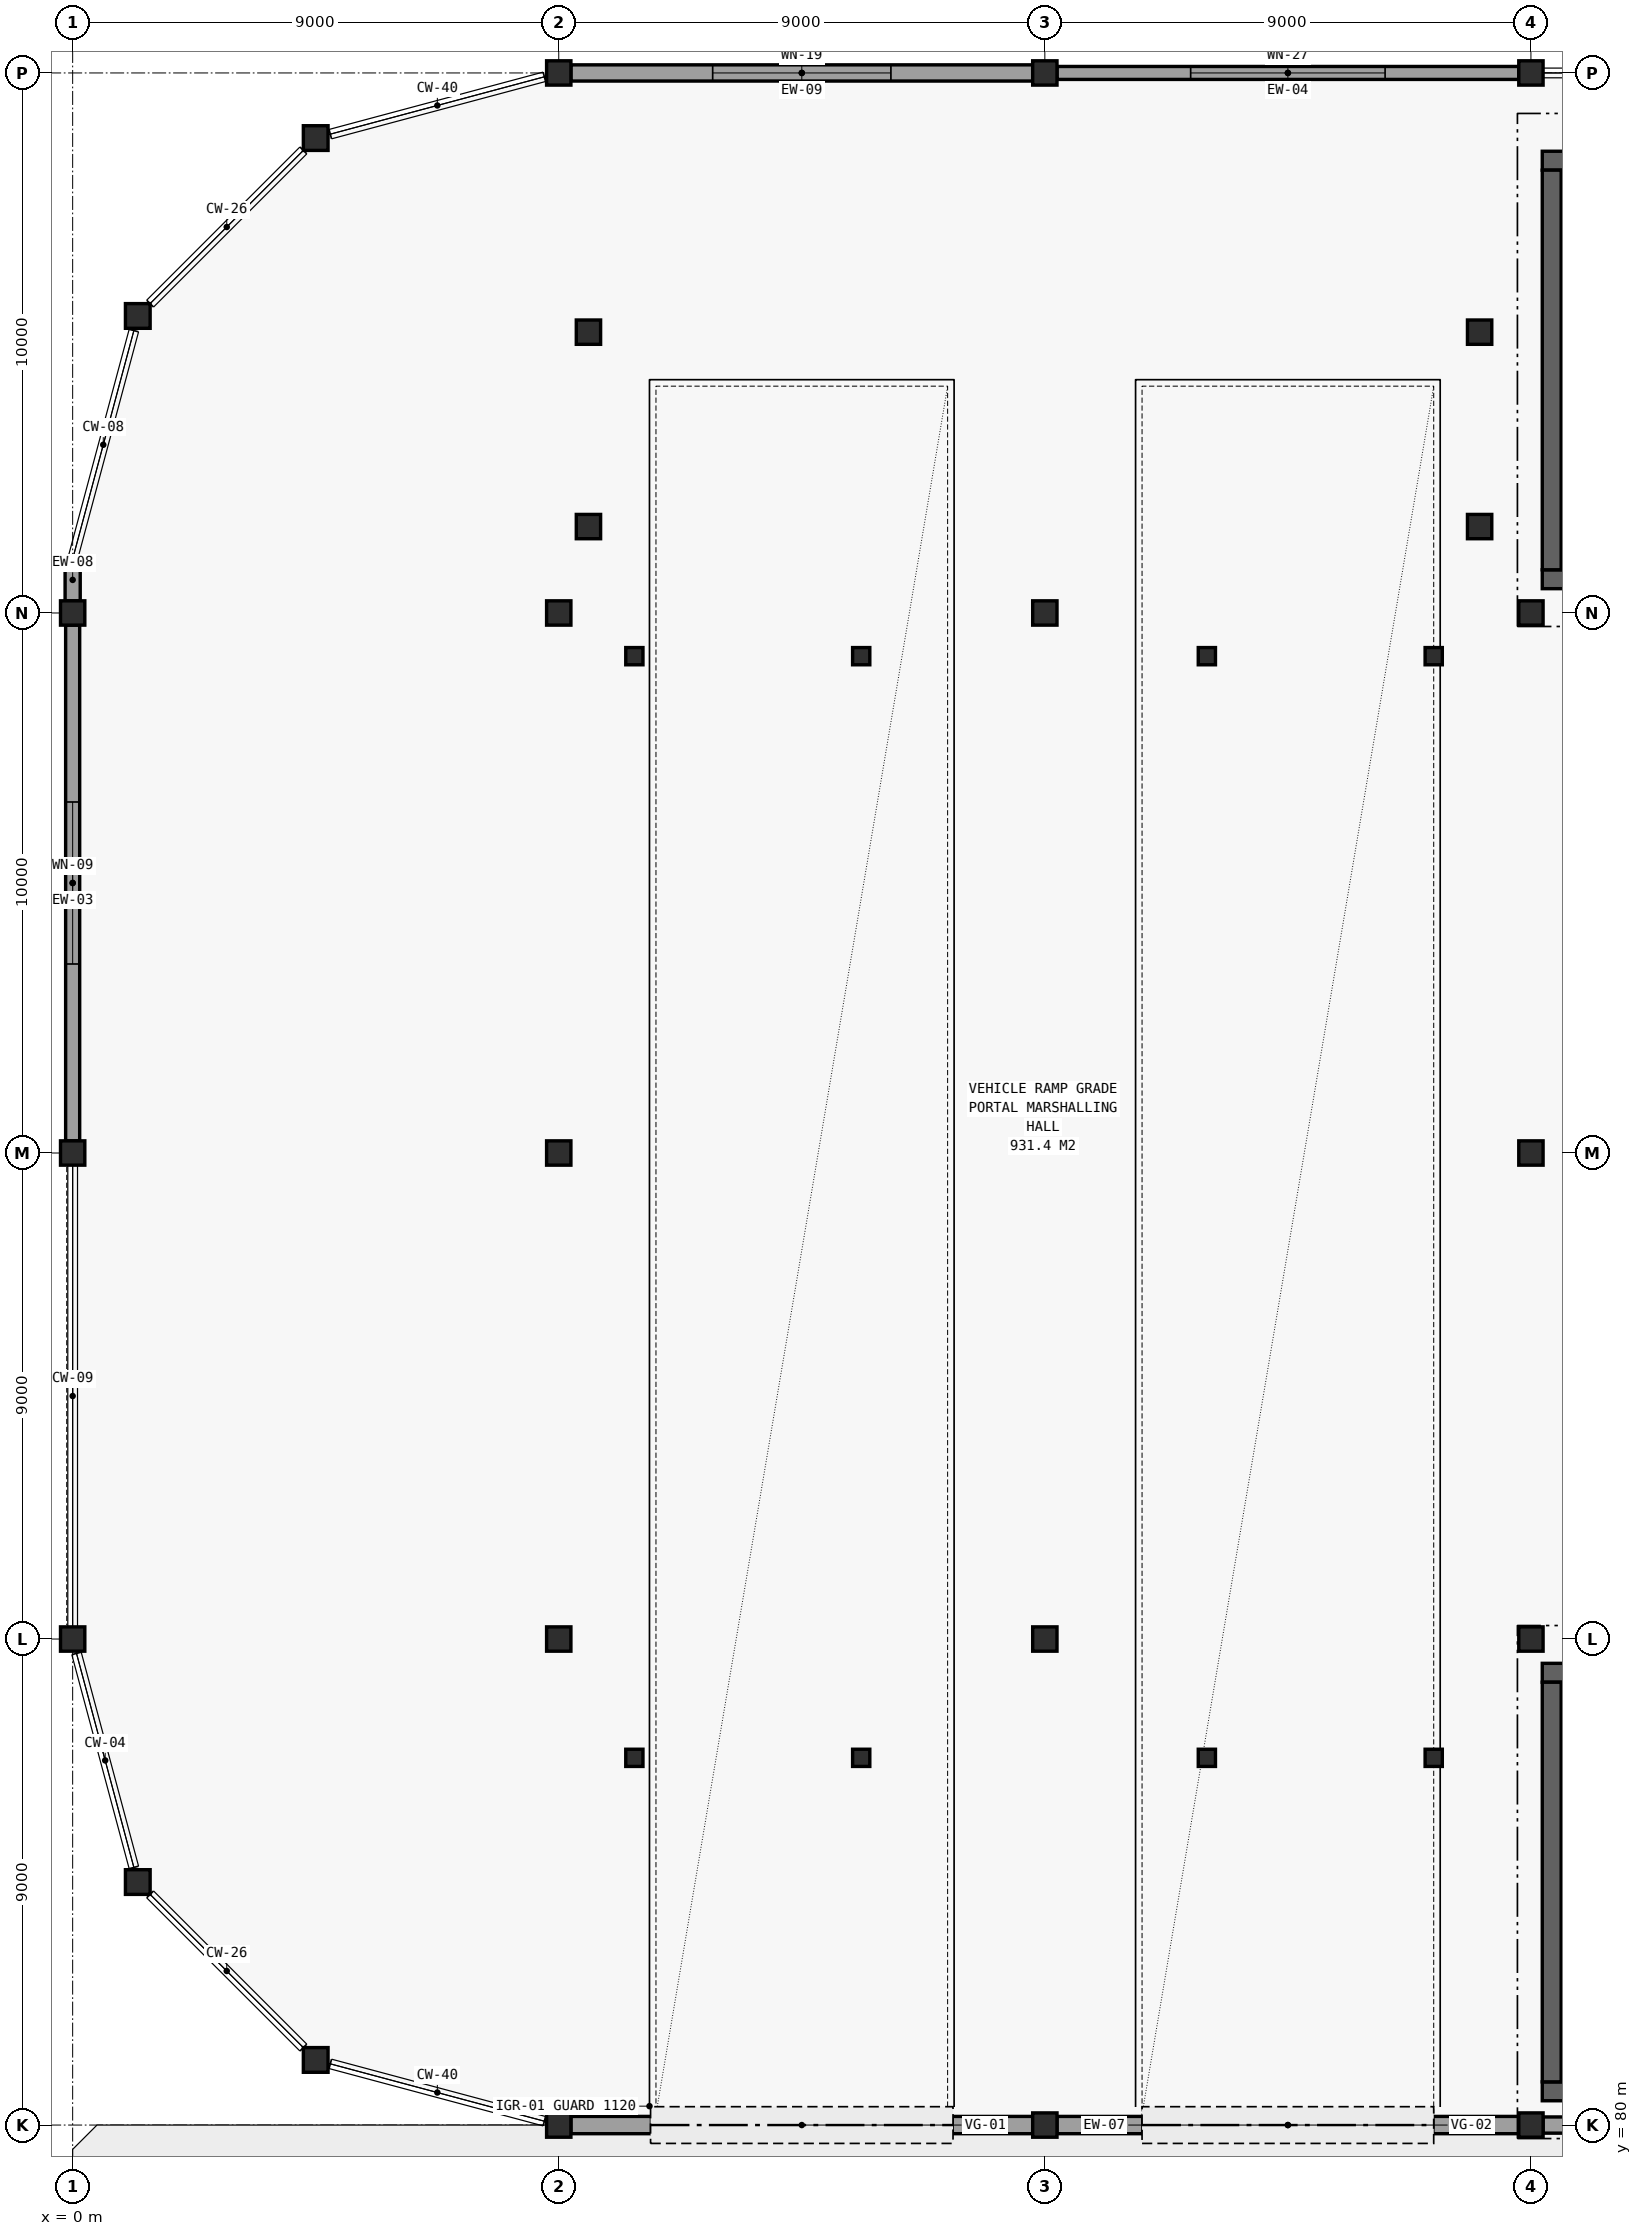
"""IFC4 building model, lengths in metres.
Left out: names, types, materials, properties, quantities, classifications, styles, units other than length and angle.
Written with IfcOpenShell. Run it as: python <this file> out.ifc"""

import sys

from ifc_helpers import new_model, si_unit, direction, frame, frame_2d, origin, origin_2d, place, context, subcontext, project, spatial, rectangle, hollow_rectangle, hollow_circle, extrude, element, fill, save


model = new_model("IFC4")
c1 = context("Model", 3, precision=1e-05, world=origin(), true_north=direction((0.0, 1.0)))
c2 = subcontext(c1, "Body", "Model", "MODEL_VIEW")
j1 = project(units=[si_unit("LENGTHUNIT", "METRE"), si_unit("PLANEANGLEUNIT", "RADIAN")], contexts=[c1])
p1 = place(None, origin())
s1 = spatial("IfcSite", under=j1, at=p1, CompositionType="ELEMENT")
p2 = place(p1, origin())
s2 = spatial("IfcBuilding", under=s1, at=p2, CompositionType="ELEMENT")
p3 = place(p2, origin())
s3 = spatial("IfcBuildingStorey", under=s2, at=p3, CompositionType="ELEMENT", Elevation=0.0)
for number, where, z_axis, x_axis in (
    (1, (0.0, 89.0, 0.0), (0.0, 0.0, 1.0), (1.0, 0.0, 0.0)),
    (2, (0.0, 98.0, 0.0), (0.0, 0.0, 1.0), (1.0, 0.0, 0.0)),
    (3, (0.0, 108.0, 0.0), (0.0, 0.0, 1.0), (1.0, 0.0, 0.0)),
):
    element("IfcColumn", number, at=place(p3, frame(where, z_axis=z_axis, x_axis=x_axis)), inside=s3, PredefinedType="COLUMN", context=c2, shape_type="SweptSolid", body=[
        extrude(hollow_rectangle(XDim=0.45, YDim=0.45, WallThickness=0.022, at=origin_2d()), origin(), (0.0, 0.0, 1.0), 5.1),
    ])
for number, where, z_axis, x_axis in (
    (4, (1.206, 84.5, 0.0), (0.0, 0.0, 1.0), (1.0, 0.0, 0.0)),
    (5, (1.206, 113.5, 0.0), (0.0, 0.0, 1.0), (1.0, 0.0, 0.0)),
    (6, (4.5, 81.206, 0.0), (0.0, 0.0, 1.0), (1.0, 0.0, 0.0)),
    (7, (4.5, 116.794, 0.0), (0.0, 0.0, 1.0), (1.0, 0.0, 0.0)),
):
    element("IfcColumn", number, at=place(p3, frame(where, z_axis=z_axis, x_axis=x_axis)), inside=s3, PredefinedType="COLUMN", context=c2, shape_type="SweptSolid", body=[
        extrude(hollow_circle(Radius=0.229, WallThickness=0.016, at=origin_2d()), origin(), (0.0, 0.0, 1.0), 5.1),
    ])
for number, where, z_axis, x_axis in (
    (8, (9.0, 80.0, 0.0), (0.0, 0.0, 1.0), (1.0, 0.0, 0.0)),
    (9, (9.0, 89.0, 0.0), (0.0, 0.0, 1.0), (1.0, 0.0, 0.0)),
    (10, (9.0, 98.0, 0.0), (0.0, 0.0, 1.0), (1.0, 0.0, 0.0)),
    (11, (9.0, 108.0, 0.0), (0.0, 0.0, 1.0), (1.0, 0.0, 0.0)),
    (12, (9.0, 118.0, 0.0), (0.0, 0.0, 1.0), (1.0, 0.0, 0.0)),
    (13, (9.55, 109.6, 0.0), (0.0, 0.0, 1.0), (1.0, 0.0, 0.0)),
    (14, (9.55, 113.2, 0.0), (0.0, 0.0, 1.0), (1.0, 0.0, 0.0)),
):
    element("IfcColumn", number, at=place(p3, frame(where, z_axis=z_axis, x_axis=x_axis)), inside=s3, PredefinedType="COLUMN", context=c2, shape_type="SweptSolid", body=[
        extrude(hollow_rectangle(XDim=0.45, YDim=0.45, WallThickness=0.022, at=origin_2d()), origin(), (0.0, 0.0, 1.0), 5.1),
    ])
for number, where, z_axis, x_axis in (
    (15, (10.4, 86.8, 0.0), (0.0, 0.0, 1.0), (1.0, 0.0, 0.0)),
    (16, (10.4, 107.2, 0.0), (0.0, 0.0, 1.0), (1.0, 0.0, 0.0)),
    (17, (14.6, 86.8, 0.0), (0.0, 0.0, 1.0), (1.0, 0.0, 0.0)),
    (18, (14.6, 107.2, 0.0), (0.0, 0.0, 1.0), (1.0, 0.0, 0.0)),
):
    element("IfcColumn", number, at=place(p3, frame(where, z_axis=z_axis, x_axis=x_axis)), inside=s3, PredefinedType="COLUMN", context=c2, shape_type="SweptSolid", body=[
        extrude(hollow_circle(Radius=0.159, WallThickness=0.01, at=origin_2d()), origin(), (0.0, 0.0, 1.0), 5.1),
    ])
for number, where, z_axis, x_axis in (
    (19, (18.0, 80.0, 0.0), (0.0, 0.0, 1.0), (1.0, 0.0, 0.0)),
    (20, (18.0, 89.0, 0.0), (0.0, 0.0, 1.0), (1.0, 0.0, 0.0)),
    (21, (18.0, 108.0, 0.0), (0.0, 0.0, 1.0), (1.0, 0.0, 0.0)),
    (22, (18.0, 118.0, 0.0), (0.0, 0.0, 1.0), (1.0, 0.0, 0.0)),
):
    element("IfcColumn", number, at=place(p3, frame(where, z_axis=z_axis, x_axis=x_axis)), inside=s3, PredefinedType="COLUMN", context=c2, shape_type="SweptSolid", body=[
        extrude(hollow_rectangle(XDim=0.45, YDim=0.45, WallThickness=0.022, at=origin_2d()), origin(), (0.0, 0.0, 1.0), 5.1),
    ])
for number, where, z_axis, x_axis in (
    (23, (21.0, 86.8, 0.0), (0.0, 0.0, 1.0), (1.0, 0.0, 0.0)),
    (24, (21.0, 107.2, 0.0), (0.0, 0.0, 1.0), (1.0, 0.0, 0.0)),
    (25, (25.2, 86.8, 0.0), (0.0, 0.0, 1.0), (1.0, 0.0, 0.0)),
    (26, (25.2, 107.2, 0.0), (0.0, 0.0, 1.0), (1.0, 0.0, 0.0)),
):
    element("IfcColumn", number, at=place(p3, frame(where, z_axis=z_axis, x_axis=x_axis)), inside=s3, PredefinedType="COLUMN", context=c2, shape_type="SweptSolid", body=[
        extrude(hollow_circle(Radius=0.159, WallThickness=0.01, at=origin_2d()), origin(), (0.0, 0.0, 1.0), 5.1),
    ])
for number, where, z_axis, x_axis in (
    (27, (26.05, 109.6, 0.0), (0.0, 0.0, 1.0), (1.0, 0.0, 0.0)),
    (28, (26.05, 113.2, 0.0), (0.0, 0.0, 1.0), (1.0, 0.0, 0.0)),
    (29, (27.0, 80.0, 0.0), (0.0, 0.0, 1.0), (1.0, 0.0, 0.0)),
    (30, (27.0, 89.0, 0.0), (0.0, 0.0, 1.0), (1.0, 0.0, 0.0)),
    (31, (27.0, 98.0, 0.0), (0.0, 0.0, 1.0), (1.0, 0.0, 0.0)),
    (32, (27.0, 108.0, 0.0), (0.0, 0.0, 1.0), (1.0, 0.0, 0.0)),
    (33, (27.0, 118.0, 0.0), (0.0, 0.0, 1.0), (1.0, 0.0, 0.0)),
):
    element("IfcColumn", number, at=place(p3, frame(where, z_axis=z_axis, x_axis=x_axis)), inside=s3, PredefinedType="COLUMN", context=c2, shape_type="SweptSolid", body=[
        extrude(hollow_rectangle(XDim=0.45, YDim=0.45, WallThickness=0.022, at=origin_2d()), origin(), (0.0, 0.0, 1.0), 5.1),
    ])
p4 = place(p3, frame((9.225, 80.0, 0.0), z_axis=(0.0, 0.0, 1.0), x_axis=(1.0, 0.0, 0.0)))
e34 = element("IfcWall", 34, at=p4, inside=s3, PredefinedType="SOLIDWALL", context=c2, shape_type="SweptSolid", body=[
    extrude(rectangle(XDim=8.55, YDim=0.32, at=frame_2d((4.275, 0.0))), origin(), (0.0, 0.0, 1.0), 4.19),
])
p5 = place(p4, frame((7.075, 0.0, 0.0), z_axis=(0.0, 0.0, 1.0), x_axis=(-1.0, 0.0, 0.0)))
e35 = element("IfcOpeningElement", 35, at=p5, cuts=e34, PredefinedType="OPENING", context=c2, shape_type="SweptSolid", body=[
    extrude(rectangle(XDim=5.6, YDim=3.8, at=frame_2d((2.8, 1.9))), frame((0.0, 0.171, 0.0), z_axis=(0.0, -1.0, 0.0), x_axis=(1.0, 0.0, 0.0)), (0.0, 0.0, 1.0), 0.342),
])
p6 = place(p3, frame((18.225, 80.0, 0.0), z_axis=(0.0, 0.0, 1.0), x_axis=(1.0, 0.0, 0.0)))
e36 = element("IfcWall", 36, at=p6, inside=s3, PredefinedType="SOLIDWALL", context=c2, shape_type="SweptSolid", body=[
    extrude(rectangle(XDim=8.55, YDim=0.32, at=frame_2d((4.275, 0.0))), origin(), (0.0, 0.0, 1.0), 4.19),
])
p7 = place(p6, frame((6.975, 0.0, 0.0), z_axis=(0.0, 0.0, 1.0), x_axis=(-1.0, 0.0, 0.0)))
e37 = element("IfcOpeningElement", 37, at=p7, cuts=e36, PredefinedType="OPENING", context=c2, shape_type="SweptSolid", body=[
    extrude(rectangle(XDim=5.4, YDim=3.8, at=frame_2d((2.7, 1.9))), frame((0.0, 0.171, 0.0), z_axis=(0.0, -1.0, 0.0), x_axis=(1.0, 0.0, 0.0)), (0.0, 0.0, 1.0), 0.342),
])
p8 = place(p3, frame((27.225, 80.0, 0.0), z_axis=(0.0, 0.0, 1.0), x_axis=(1.0, 0.0, 0.0)))
e38 = element("IfcWall", 38, at=p8, inside=s3, PredefinedType="SOLIDWALL", context=c2, shape_type="SweptSolid", body=[
    extrude(rectangle(XDim=8.55, YDim=0.3, at=frame_2d((4.275, 0.0))), origin(), (0.0, 0.0, 1.0), 4.19),
])
p9 = place(p8, frame((7.075, 0.0, 0.0), z_axis=(0.0, 0.0, 1.0), x_axis=(-1.0, 0.0, 0.0)))
e39 = element("IfcOpeningElement", 39, at=p9, cuts=e38, PredefinedType="OPENING", context=c2, shape_type="SweptSolid", body=[
    extrude(rectangle(XDim=1.9, YDim=2.4, at=frame_2d((0.95, 1.2))), frame((0.0, 0.161, 0.0), z_axis=(0.0, -1.0, 0.0), x_axis=(1.0, 0.0, 0.0)), (0.0, 0.0, 1.0), 0.322),
])
p10 = place(p3, frame((26.775, 118.0, 0.0), z_axis=(0.0, 0.0, 1.0), x_axis=(-1.0, 0.0, 0.0)))
e40 = element("IfcWall", 40, at=p10, inside=s3, PredefinedType="SOLIDWALL", context=c2, shape_type="SweptSolid", body=[
    extrude(rectangle(XDim=8.55, YDim=0.24, at=frame_2d((4.275, 0.0))), origin(), (0.0, 0.0, 1.0), 4.19),
])
p11 = place(p10, frame((2.475, 0.0, 0.95)))
e41 = element("IfcOpeningElement", 41, at=p11, cuts=e40, PredefinedType="OPENING", context=c2, shape_type="SweptSolid", body=[
    extrude(rectangle(XDim=3.6, YDim=1.5, at=frame_2d((1.8, 0.75))), frame((0.0, 0.131, 0.0), z_axis=(0.0, -1.0, 0.0), x_axis=(1.0, 0.0, 0.0)), (0.0, 0.0, 1.0), 0.262),
])
p12 = place(p3, frame((17.775, 118.0, 0.0), z_axis=(0.0, 0.0, 1.0), x_axis=(-1.0, 0.0, 0.0)))
e42 = element("IfcWall", 42, at=p12, inside=s3, PredefinedType="SOLIDWALL", context=c2, shape_type="SweptSolid", body=[
    extrude(rectangle(XDim=8.55, YDim=0.3, at=frame_2d((4.275, 0.0))), origin(), (0.0, 0.0, 1.0), 4.19),
])
p13 = place(p12, frame((2.625, 0.0, 0.95)))
e43 = element("IfcOpeningElement", 43, at=p13, cuts=e42, PredefinedType="OPENING", context=c2, shape_type="SweptSolid", body=[
    extrude(rectangle(XDim=3.3, YDim=1.4, at=frame_2d((1.65, 0.7))), frame((0.0, 0.161, 0.0), z_axis=(0.0, -1.0, 0.0), x_axis=(1.0, 0.0, 0.0)), (0.0, 0.0, 1.0), 0.322),
])
p14 = place(p3, frame((0.0, 109.0, 0.0), z_axis=(0.0, 0.0, 1.0), x_axis=(0.0, -1.0, 0.0)))
e44 = element("IfcWall", 44, at=p14, inside=s3, PredefinedType="SOLIDWALL", context=c2, shape_type="SweptSolid", body=[
    extrude(rectangle(XDim=0.775, YDim=0.28, at=frame_2d((0.387, 0.0))), origin(), (0.0, 0.0, 1.0), 4.84),
])
p15 = place(p3, frame((0.0, 107.775, 0.0), z_axis=(0.0, 0.0, 1.0), x_axis=(0.0, -1.0, 0.0)))
e45 = element("IfcWall", 45, at=p15, inside=s3, PredefinedType="SOLIDWALL", context=c2, shape_type="SweptSolid", body=[
    extrude(rectangle(XDim=9.55, YDim=0.26, at=frame_2d((4.775, 0.0))), origin(), (0.0, 0.0, 1.0), 4.14),
])
p16 = place(p15, frame((3.275, 0.0, 0.95)))
e46 = element("IfcOpeningElement", 46, at=p16, cuts=e45, PredefinedType="OPENING", context=c2, shape_type="SweptSolid", body=[
    extrude(rectangle(XDim=3.0, YDim=1.4, at=frame_2d((1.5, 0.7))), frame((0.0, 0.141, 0.0), z_axis=(0.0, -1.0, 0.0), x_axis=(1.0, 0.0, 0.0)), (0.0, 0.0, 1.0), 0.282),
])
for number, where, z_axis, x_axis in (
    (47, (27.21, 80.625, 0.0), (0.0, 0.0, 1.0), (1.0, 0.0, 0.0)),
    (48, (27.21, 88.375, 0.0), (0.0, 0.0, 1.0), (1.0, 0.0, 0.0)),
):
    element("IfcWall", number, at=place(p3, frame(where, z_axis=z_axis, x_axis=x_axis)), inside=s3, PredefinedType="SHEAR", context=c2, shape_type="SweptSolid", body=[
        extrude(rectangle(XDim=3.98, YDim=0.35, at=frame_2d((1.99, 0.0))), origin(), (0.0, 0.0, 1.0), 4.84),
    ])
p17 = place(p3, frame((27.385, 80.8, 0.0), z_axis=(0.0, 0.0, 1.0), x_axis=(0.0, 1.0, 0.0)))
e49 = element("IfcWall", 49, at=p17, inside=s3, PredefinedType="SHEAR", context=c2, shape_type="SweptSolid", body=[
    extrude(rectangle(XDim=7.4, YDim=0.35, at=frame_2d((3.7, 0.0))), origin(), (0.0, 0.0, 1.0), 4.84),
])
for number, where, z_axis, x_axis in (
    (50, (27.21, 108.625, 0.0), (0.0, 0.0, 1.0), (1.0, 0.0, 0.0)),
    (51, (27.21, 116.375, 0.0), (0.0, 0.0, 1.0), (1.0, 0.0, 0.0)),
):
    element("IfcWall", number, at=place(p3, frame(where, z_axis=z_axis, x_axis=x_axis)), inside=s3, PredefinedType="SHEAR", context=c2, shape_type="SweptSolid", body=[
        extrude(rectangle(XDim=3.98, YDim=0.35, at=frame_2d((1.99, 0.0))), origin(), (0.0, 0.0, 1.0), 4.84),
    ])
p18 = place(p3, frame((27.385, 108.8, 0.0), z_axis=(0.0, 0.0, 1.0), x_axis=(0.0, 1.0, 0.0)))
e52 = element("IfcWall", 52, at=p18, inside=s3, PredefinedType="SHEAR", context=c2, shape_type="SweptSolid", body=[
    extrude(rectangle(XDim=7.4, YDim=0.35, at=frame_2d((3.7, 0.0))), origin(), (0.0, 0.0, 1.0), 4.84),
])
p19 = place(p5, origin())
e53 = element("IfcDoor", 53, at=p19, inside=s3, OperationType="SINGLE_SWING_LEFT", PredefinedType="DOOR", context=c2, shape_type="SweptSolid", body=[
    extrude(rectangle(XDim=5.6, YDim=3.8, at=frame_2d((2.8, 1.9))), frame((0.0, 0.025, 0.0), z_axis=(0.0, -1.0, 0.0), x_axis=(1.0, 0.0, 0.0)), (0.0, 0.0, 1.0), 0.05),
])
fill(e35, e53)
p20 = place(p7, origin())
e54 = element("IfcDoor", 54, at=p20, inside=s3, OperationType="SINGLE_SWING_LEFT", PredefinedType="DOOR", context=c2, shape_type="SweptSolid", body=[
    extrude(rectangle(XDim=5.4, YDim=3.8, at=frame_2d((2.7, 1.9))), frame((0.0, 0.025, 0.0), z_axis=(0.0, -1.0, 0.0), x_axis=(1.0, 0.0, 0.0)), (0.0, 0.0, 1.0), 0.05),
])
fill(e37, e54)
p21 = place(p11, origin())
e55 = element("IfcWindow", 55, at=p21, inside=s3, PartitioningType="SINGLE_PANEL", PredefinedType="WINDOW", context=c2, shape_type="SweptSolid", body=[
    extrude(rectangle(XDim=3.6, YDim=1.5, at=frame_2d((1.8, 0.75))), frame((0.0, 0.03, 0.0), z_axis=(0.0, -1.0, 0.0), x_axis=(1.0, 0.0, 0.0)), (0.0, 0.0, 1.0), 0.06),
])
fill(e41, e55)
p22 = place(p13, origin())
e56 = element("IfcWindow", 56, at=p22, inside=s3, PartitioningType="SINGLE_PANEL", PredefinedType="WINDOW", context=c2, shape_type="SweptSolid", body=[
    extrude(rectangle(XDim=3.3, YDim=1.4, at=frame_2d((1.65, 0.7))), frame((0.0, 0.03, 0.0), z_axis=(0.0, -1.0, 0.0), x_axis=(1.0, 0.0, 0.0)), (0.0, 0.0, 1.0), 0.06),
])
fill(e43, e56)
p23 = place(p16, origin())
e57 = element("IfcWindow", 57, at=p23, inside=s3, PartitioningType="SINGLE_PANEL", PredefinedType="WINDOW", context=c2, shape_type="SweptSolid", body=[
    extrude(rectangle(XDim=3.0, YDim=1.4, at=frame_2d((1.5, 0.7))), frame((0.0, 0.03, 0.0), z_axis=(0.0, -1.0, 0.0), x_axis=(1.0, 0.0, 0.0)), (0.0, 0.0, 1.0), 0.06),
])
fill(e46, e57)
save(model, sys.argv[1])
